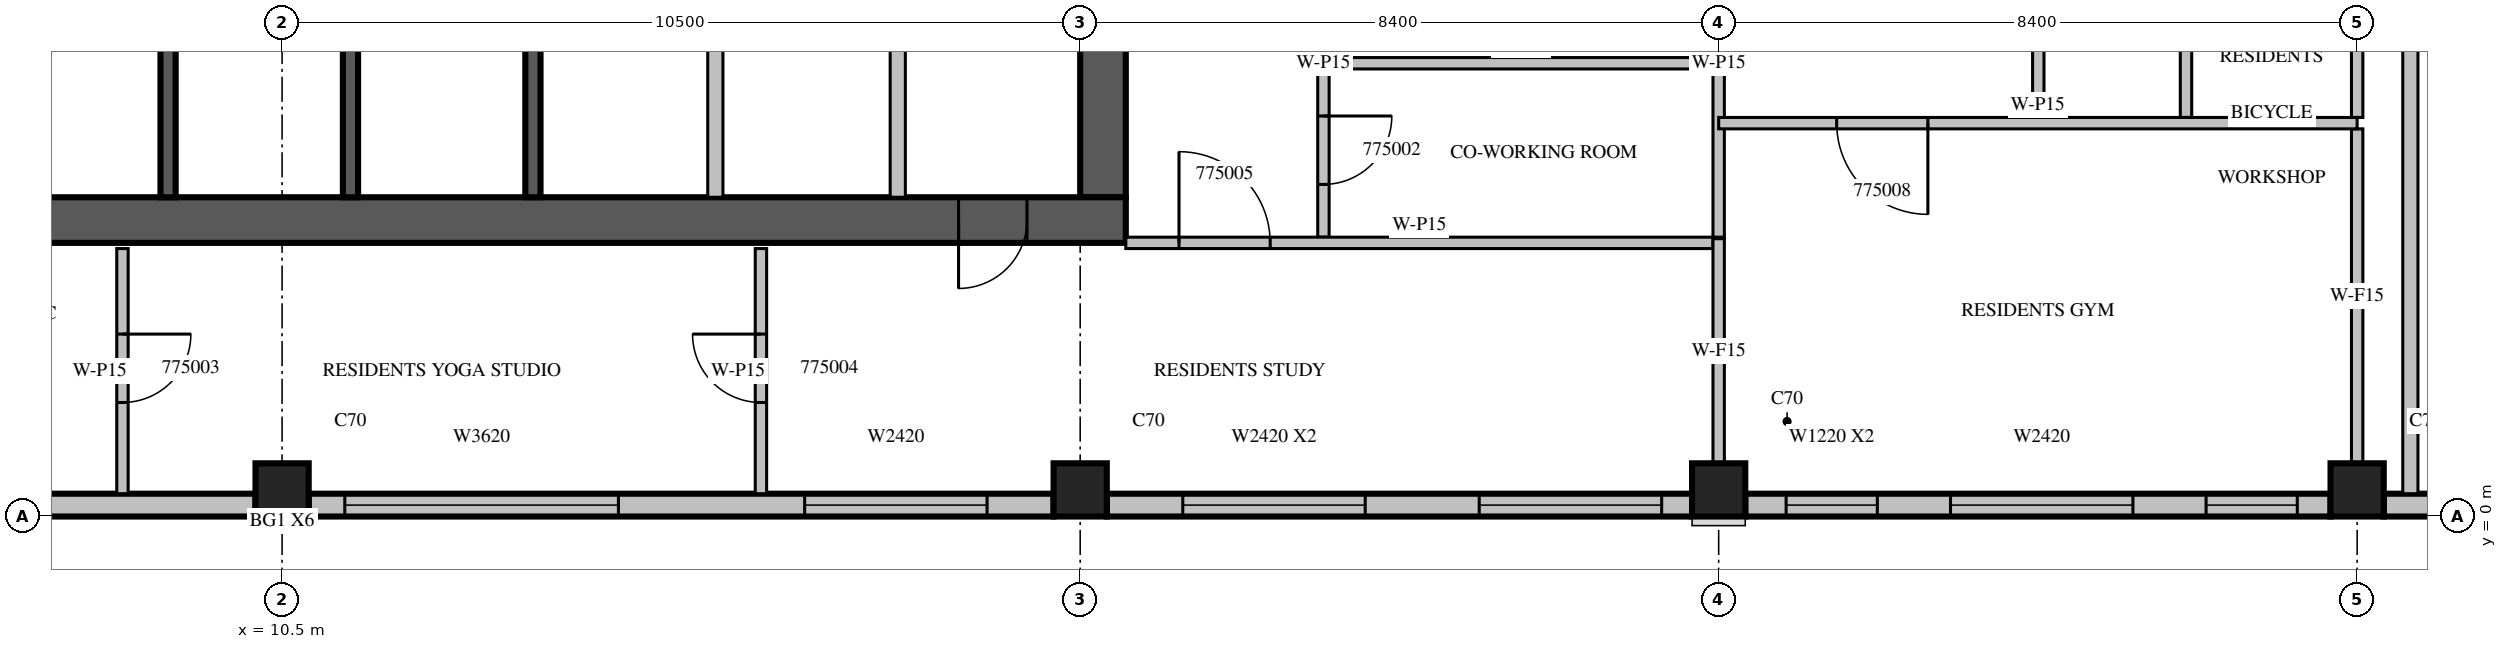
"""IFC4 building model, lengths in metres.
Left out: names, types, materials, properties, quantities, classifications, styles, units other than length and angle.
Written with IfcOpenShell. Run it as: python <this file> out.ifc"""

import sys

from ifc_helpers import new_model, si_unit, direction, frame, frame_2d, origin, origin_2d, place, context, subcontext, project, spatial, rectangle, extrude, source, transform, mapped, element, fill, save


model = new_model("IFC4")
c1 = context("Model", 3, precision=1e-05, world=origin(), true_north=direction((0.0, 1.0)))
c2 = subcontext(c1, "Body", "Model", "MODEL_VIEW")
j1 = project(units=[si_unit("LENGTHUNIT", "METRE"), si_unit("PLANEANGLEUNIT", "RADIAN")], contexts=[c1])
p1 = place(None, origin())
s1 = spatial("IfcSite", under=j1, at=p1, CompositionType="ELEMENT")
p2 = place(p1, origin())
s2 = spatial("IfcBuilding", under=s1, at=p2, CompositionType="ELEMENT")
p3 = place(p2, frame((0.0, 0.0, 323.0)))
s3 = spatial("IfcBuildingStorey", under=s2, at=p3, CompositionType="ELEMENT", Elevation=323.0)
m1 = source(origin(), c2, "Body", "SweptSolid", [
    extrude(rectangle(XDim=0.7, YDim=0.7, at=origin_2d()), origin(), (0.0, 0.0, 1.0), 3.5),
])
for number, where, z_axis, x_axis in (
    (1, (10.5, 0.35, 0.0), (0.0, 0.0, 1.0), (1.0, 0.0, 0.0)),
    (2, (21.0, 0.35, 0.0), (0.0, 0.0, 1.0), (1.0, 0.0, 0.0)),
    (3, (29.4, 0.35, 0.0), (0.0, 0.0, 1.0), (1.0, 0.0, 0.0)),
    (4, (37.8, 0.35, 0.0), (0.0, 0.0, 1.0), (1.0, 0.0, 0.0)),
):
    element("IfcColumn", number, at=place(p3, frame(where, z_axis=z_axis, x_axis=x_axis)), inside=s3, PredefinedType="COLUMN", context=c2, shape_type="MappedRepresentation", body=[
        mapped(m1, transform((0.0, 0.0, 0.0), scale=1.0)),
    ])
m2 = source(origin(), c2, "Body", "SweptSolid", [
    extrude(rectangle(XDim=6.3, YDim=0.6, at=frame_2d((3.15, 0.0))), origin(), (0.0, 0.0, 1.0), 3.5),
])
p4 = place(p3, frame((21.3, 4.2, 0.0), z_axis=(0.0, 0.0, 1.0), x_axis=(0.0, 1.0, 0.0)))
e5 = element("IfcWall", 5, at=p4, inside=s3, PredefinedType="SHEAR", context=c2, shape_type="MappedRepresentation", body=[
    mapped(m2, transform((0.0, 0.0, 0.0), scale=1.0)),
])
m3 = source(origin(), c2, "Body", "SweptSolid", [
    extrude(rectangle(XDim=2.2, YDim=2.1, at=frame_2d((1.1, 1.05))), frame((0.0, 0.31, 0.0), z_axis=(0.0, -1.0, 0.0), x_axis=(1.0, 0.0, 0.0)), (0.0, 0.0, 1.0), 0.62),
])
p5 = place(p4, frame((4.0, 0.0, 0.0)))
e6 = element("IfcOpeningElement", 6, at=p5, cuts=e5, PredefinedType="OPENING", context=c2, shape_type="MappedRepresentation", body=[
    mapped(m3, transform((0.0, 0.0, 0.0), scale=1.0)),
])
m4 = source(origin(), c2, "Body", "SweptSolid", [
    extrude(rectangle(XDim=17.4, YDim=0.6, at=frame_2d((8.7, 0.0))), origin(), (0.0, 0.0, 1.0), 3.5),
])
p6 = place(p3, frame((4.2, 3.9, 0.0), z_axis=(0.0, 0.0, 1.0), x_axis=(1.0, 0.0, 0.0)))
e7 = element("IfcWall", 7, at=p6, inside=s3, PredefinedType="SHEAR", context=c2, shape_type="MappedRepresentation", body=[
    mapped(m4, transform((0.0, 0.0, 0.0), scale=1.0)),
])
m5 = source(origin(), c2, "Body", "SweptSolid", [
    extrude(rectangle(XDim=0.9, YDim=2.1, at=frame_2d((0.45, 1.05))), frame((0.0, 0.31, 0.0), z_axis=(0.0, -1.0, 0.0), x_axis=(1.0, 0.0, 0.0)), (0.0, 0.0, 1.0), 0.62),
])
p7 = place(p6, frame((15.2, 0.0, 0.0)))
e8 = element("IfcOpeningElement", 8, at=p7, cuts=e7, PredefinedType="OPENING", context=c2, shape_type="MappedRepresentation", body=[
    mapped(m5, transform((0.0, 0.0, 0.0), scale=1.0)),
])
m6 = source(origin(), c2, "Body", "SweptSolid", [
    extrude(rectangle(XDim=5.95, YDim=0.3, at=frame_2d((2.975, 0.0))), origin(), (0.0, 0.0, 1.0), 3.1),
])
p8 = place(p3, frame((4.2, 0.15, 0.0), z_axis=(0.0, 0.0, 1.0), x_axis=(1.0, 0.0, 0.0)))
e9 = element("IfcWall", 9, at=p8, inside=s3, PredefinedType="STANDARD", context=c2, shape_type="MappedRepresentation", body=[
    mapped(m6, transform((0.0, 0.0, 0.0), scale=1.0)),
])
m7 = source(origin(), c2, "Body", "SweptSolid", [
    extrude(rectangle(XDim=1.8, YDim=2.0, at=frame_2d((0.9, 1.0))), frame((0.0, 0.16, 0.0), z_axis=(0.0, -1.0, 0.0), x_axis=(1.0, 0.0, 0.0)), (0.0, 0.0, 1.0), 0.32),
])
p9 = place(p8, frame((0.675, 0.0, 0.6)))
e10 = element("IfcOpeningElement", 10, at=p9, cuts=e9, PredefinedType="OPENING", context=c2, shape_type="MappedRepresentation", body=[
    mapped(m7, transform((0.0, 0.0, 0.0), scale=1.0)),
])
m8 = source(origin(), c2, "Body", "SweptSolid", [
    extrude(rectangle(XDim=9.8, YDim=0.3, at=frame_2d((4.9, 0.0))), origin(), (0.0, 0.0, 1.0), 3.1),
])
p10 = place(p3, frame((10.85, 0.15, 0.0), z_axis=(0.0, 0.0, 1.0), x_axis=(1.0, 0.0, 0.0)))
e11 = element("IfcWall", 11, at=p10, inside=s3, PredefinedType="STANDARD", context=c2, shape_type="MappedRepresentation", body=[
    mapped(m8, transform((0.0, 0.0, 0.0), scale=1.0)),
])
m9 = source(origin(), c2, "Body", "SweptSolid", [
    extrude(rectangle(XDim=3.6, YDim=2.0, at=frame_2d((1.8, 1.0))), frame((0.0, 0.16, 0.0), z_axis=(0.0, -1.0, 0.0), x_axis=(1.0, 0.0, 0.0)), (0.0, 0.0, 1.0), 0.32),
])
p11 = place(p10, frame((0.475, 0.0, 0.6)))
e12 = element("IfcOpeningElement", 12, at=p11, cuts=e11, PredefinedType="OPENING", context=c2, shape_type="MappedRepresentation", body=[
    mapped(m9, transform((0.0, 0.0, 0.0), scale=1.0)),
])
m10 = source(origin(), c2, "Body", "SweptSolid", [
    extrude(rectangle(XDim=2.4, YDim=2.0, at=frame_2d((1.2, 1.0))), frame((0.0, 0.16, 0.0), z_axis=(0.0, -1.0, 0.0), x_axis=(1.0, 0.0, 0.0)), (0.0, 0.0, 1.0), 0.32),
])
p12 = place(p10, frame((6.525, 0.0, 0.6)))
e13 = element("IfcOpeningElement", 13, at=p12, cuts=e11, PredefinedType="OPENING", context=c2, shape_type="MappedRepresentation", body=[
    mapped(m10, transform((0.0, 0.0, 0.0), scale=1.0)),
])
m11 = source(origin(), c2, "Body", "SweptSolid", [
    extrude(rectangle(XDim=7.7, YDim=0.3, at=frame_2d((3.85, 0.0))), origin(), (0.0, 0.0, 1.0), 3.1),
])
p13 = place(p3, frame((21.35, 0.15, 0.0), z_axis=(0.0, 0.0, 1.0), x_axis=(1.0, 0.0, 0.0)))
e14 = element("IfcWall", 14, at=p13, inside=s3, PredefinedType="STANDARD", context=c2, shape_type="MappedRepresentation", body=[
    mapped(m11, transform((0.0, 0.0, 0.0), scale=1.0)),
])
p14 = place(p13, frame((1.0, 0.0, 0.6)))
e15 = element("IfcOpeningElement", 15, at=p14, cuts=e14, PredefinedType="OPENING", context=c2, shape_type="MappedRepresentation", body=[
    mapped(m10, transform((0.0, 0.0, 0.0), scale=1.0)),
])
p15 = place(p13, frame((4.9, 0.0, 0.6)))
e16 = element("IfcOpeningElement", 16, at=p15, cuts=e14, PredefinedType="OPENING", context=c2, shape_type="MappedRepresentation", body=[
    mapped(m10, transform((0.0, 0.0, 0.0), scale=1.0)),
])
p16 = place(p3, frame((29.75, 0.15, 0.0), z_axis=(0.0, 0.0, 1.0), x_axis=(1.0, 0.0, 0.0)))
e17 = element("IfcWall", 17, at=p16, inside=s3, PredefinedType="STANDARD", context=c2, shape_type="MappedRepresentation", body=[
    mapped(m11, transform((0.0, 0.0, 0.0), scale=1.0)),
])
m12 = source(origin(), c2, "Body", "SweptSolid", [
    extrude(rectangle(XDim=1.2, YDim=2.0, at=frame_2d((0.6, 1.0))), frame((0.0, 0.16, 0.0), z_axis=(0.0, -1.0, 0.0), x_axis=(1.0, 0.0, 0.0)), (0.0, 0.0, 1.0), 0.32),
])
p17 = place(p16, frame((0.537, 0.0, 0.6)))
e18 = element("IfcOpeningElement", 18, at=p17, cuts=e17, PredefinedType="OPENING", context=c2, shape_type="MappedRepresentation", body=[
    mapped(m12, transform((0.0, 0.0, 0.0), scale=1.0)),
])
p18 = place(p16, frame((6.062, 0.0, 0.6)))
e19 = element("IfcOpeningElement", 19, at=p18, cuts=e17, PredefinedType="OPENING", context=c2, shape_type="MappedRepresentation", body=[
    mapped(m12, transform((0.0, 0.0, 0.0), scale=1.0)),
])
p19 = place(p16, frame((2.7, 0.0, 0.6)))
e20 = element("IfcOpeningElement", 20, at=p19, cuts=e17, PredefinedType="OPENING", context=c2, shape_type="MappedRepresentation", body=[
    mapped(m10, transform((0.0, 0.0, 0.0), scale=1.0)),
])
m13 = source(origin(), c2, "Body", "SweptSolid", [
    extrude(rectangle(XDim=2.05, YDim=0.3, at=frame_2d((1.025, 0.0))), origin(), (0.0, 0.0, 1.0), 3.1),
])
p20 = place(p3, frame((38.15, 0.15, 0.0), z_axis=(0.0, 0.0, 1.0), x_axis=(1.0, 0.0, 0.0)))
e21 = element("IfcWall", 21, at=p20, inside=s3, PredefinedType="STANDARD", context=c2, shape_type="MappedRepresentation", body=[
    mapped(m13, transform((0.0, 0.0, 0.0), scale=1.0)),
])
m14 = source(origin(), c2, "Body", "SweptSolid", [
    extrude(rectangle(XDim=3.1, YDim=0.2, at=frame_2d((1.55, 0.0))), origin(), (0.0, 0.0, 1.0), 3.5),
])
for number, where, z_axis, x_axis in (
    (22, (9.0, 4.2, 0.0), (0.0, 0.0, 1.0), (0.0, 1.0, 0.0)),
    (23, (11.4, 4.2, 0.0), (0.0, 0.0, 1.0), (0.0, 1.0, 0.0)),
):
    element("IfcWall", number, at=place(p3, frame(where, z_axis=z_axis, x_axis=x_axis)), inside=s3, PredefinedType="SOLIDWALL", context=c2, shape_type="MappedRepresentation", body=[
        mapped(m14, transform((0.0, 0.0, 0.0), scale=1.0)),
    ])
m15 = source(origin(), c2, "Body", "SweptSolid", [
    extrude(rectangle(XDim=3.1, YDim=0.2, at=frame_2d((1.55, 0.0))), origin(), (0.0, 0.0, 1.0), 3.1),
])
p21 = place(p3, frame((13.8, 4.2, 0.0), z_axis=(0.0, 0.0, 1.0), x_axis=(0.0, 1.0, 0.0)))
e24 = element("IfcWall", 24, at=p21, inside=s3, PredefinedType="SOLIDWALL", context=c2, shape_type="MappedRepresentation", body=[
    mapped(m15, transform((0.0, 0.0, 0.0), scale=1.0)),
])
m16 = source(origin(), c2, "Body", "SweptSolid", [
    extrude(rectangle(XDim=3.1, YDim=0.2, at=frame_2d((1.55, 0.0))), origin(), (0.0, 0.0, 1.0), 3.1),
])
for number, where, z_axis, x_axis in (
    (25, (16.2, 4.2, 0.0), (0.0, 0.0, 1.0), (0.0, 1.0, 0.0)),
    (26, (18.6, 4.2, 0.0), (0.0, 0.0, 1.0), (0.0, 1.0, 0.0)),
):
    element("IfcWall", number, at=place(p3, frame(where, z_axis=z_axis, x_axis=x_axis)), inside=s3, PredefinedType="PARTITIONING", context=c2, shape_type="MappedRepresentation", body=[
        mapped(m16, transform((0.0, 0.0, 0.0), scale=1.0)),
    ])
m17 = source(origin(), c2, "Body", "SweptSolid", [
    extrude(rectangle(XDim=8.0, YDim=0.2, at=frame_2d((4.0, 0.0))), origin(), (0.0, 0.0, 1.0), 3.1),
])
p22 = place(p3, frame((38.5, 0.3, 0.0), z_axis=(0.0, 0.0, 1.0), x_axis=(0.0, 1.0, 0.0)))
e27 = element("IfcWall", 27, at=p22, inside=s3, PredefinedType="PARTITIONING", context=c2, shape_type="MappedRepresentation", body=[
    mapped(m17, transform((0.0, 0.0, 0.0), scale=1.0)),
])
m18 = source(origin(), c2, "Body", "SweptSolid", [
    extrude(rectangle(XDim=4.575, YDim=0.15, at=frame_2d((2.288, 0.0))), origin(), (0.0, 0.0, 1.0), 3.1),
])
p23 = place(p3, frame((24.2, 8.25, 0.0), z_axis=(0.0, 0.0, 1.0), x_axis=(0.0, -1.0, 0.0)))
e28 = element("IfcWall", 28, at=p23, inside=s3, PredefinedType="PARTITIONING", context=c2, shape_type="MappedRepresentation", body=[
    mapped(m18, transform((0.0, 0.0, 0.0), scale=1.0)),
])
m19 = source(origin(), c2, "Body", "SweptSolid", [
    extrude(rectangle(XDim=0.9, YDim=2.1, at=frame_2d((0.45, 1.05))), frame((0.0, 0.085, 0.0), z_axis=(0.0, -1.0, 0.0), x_axis=(1.0, 0.0, 0.0)), (0.0, 0.0, 1.0), 0.17),
])
p24 = place(p23, frame((2.981, 0.0, 0.0)))
e29 = element("IfcOpeningElement", 29, at=p24, cuts=e28, PredefinedType="OPENING", context=c2, shape_type="MappedRepresentation", body=[
    mapped(m19, transform((0.0, 0.0, 0.0), scale=1.0)),
])
p25 = place(p3, frame((29.4, 3.675, 0.0), z_axis=(0.0, 0.0, 1.0), x_axis=(0.0, 1.0, 0.0)))
e30 = element("IfcWall", 30, at=p25, inside=s3, PredefinedType="PARTITIONING", context=c2, shape_type="MappedRepresentation", body=[
    mapped(m18, transform((0.0, 0.0, 0.0), scale=1.0)),
])
m20 = source(origin(), c2, "Body", "SweptSolid", [
    extrude(rectangle(XDim=5.05, YDim=0.15, at=frame_2d((2.525, 0.0))), origin(), (0.0, 0.0, 1.0), 3.1),
])
p26 = place(p3, frame((29.325, 5.963, 0.0), z_axis=(0.0, 0.0, 1.0), x_axis=(-1.0, 0.0, 0.0)))
e31 = element("IfcWall", 31, at=p26, inside=s3, PredefinedType="PARTITIONING", context=c2, shape_type="MappedRepresentation", body=[
    mapped(m20, transform((0.0, 0.0, 0.0), scale=1.0)),
])
m21 = source(origin(), c2, "Body", "SweptSolid", [
    extrude(rectangle(XDim=3.225, YDim=0.15, at=frame_2d((1.613, 0.0))), origin(), (0.0, 0.0, 1.0), 3.1),
])
p27 = place(p3, frame((8.4, 3.525, 0.0), z_axis=(0.0, 0.0, 1.0), x_axis=(0.0, -1.0, 0.0)))
e32 = element("IfcWall", 32, at=p27, inside=s3, PredefinedType="PARTITIONING", context=c2, shape_type="MappedRepresentation", body=[
    mapped(m21, transform((0.0, 0.0, 0.0), scale=1.0)),
])
p28 = place(p27, frame((1.125, 0.0, 0.0)))
e33 = element("IfcOpeningElement", 33, at=p28, cuts=e32, PredefinedType="OPENING", context=c2, shape_type="MappedRepresentation", body=[
    mapped(m19, transform((0.0, 0.0, 0.0), scale=1.0)),
])
p29 = place(p3, frame((16.8, 3.525, 0.0), z_axis=(0.0, 0.0, 1.0), x_axis=(0.0, -1.0, 0.0)))
e34 = element("IfcWall", 34, at=p29, inside=s3, PredefinedType="PARTITIONING", context=c2, shape_type="MappedRepresentation", body=[
    mapped(m21, transform((0.0, 0.0, 0.0), scale=1.0)),
])
p30 = place(p29, frame((1.125, 0.0, 0.0)))
e35 = element("IfcOpeningElement", 35, at=p30, cuts=e34, PredefinedType="OPENING", context=c2, shape_type="MappedRepresentation", body=[
    mapped(m19, transform((0.0, 0.0, 0.0), scale=1.0)),
])
m22 = source(origin(), c2, "Body", "SweptSolid", [
    extrude(rectangle(XDim=7.725, YDim=0.15, at=frame_2d((3.862, 0.0))), origin(), (0.0, 0.0, 1.0), 3.1),
])
p31 = place(p3, frame((21.6, 3.6, 0.0), z_axis=(0.0, 0.0, 1.0), x_axis=(1.0, 0.0, 0.0)))
e36 = element("IfcWall", 36, at=p31, inside=s3, PredefinedType="PARTITIONING", context=c2, shape_type="MappedRepresentation", body=[
    mapped(m22, transform((0.0, 0.0, 0.0), scale=1.0)),
])
m23 = source(origin(), c2, "Body", "SweptSolid", [
    extrude(rectangle(XDim=1.2, YDim=2.1, at=frame_2d((0.6, 1.05))), frame((0.0, 0.085, 0.0), z_axis=(0.0, -1.0, 0.0), x_axis=(1.0, 0.0, 0.0)), (0.0, 0.0, 1.0), 0.17),
])
p32 = place(p31, frame((0.7, 0.0, 0.0)))
e37 = element("IfcOpeningElement", 37, at=p32, cuts=e36, PredefinedType="OPENING", context=c2, shape_type="MappedRepresentation", body=[
    mapped(m23, transform((0.0, 0.0, 0.0), scale=1.0)),
])
m24 = source(origin(), c2, "Body", "SweptSolid", [
    extrude(rectangle(XDim=3.0, YDim=0.15, at=frame_2d((1.5, 0.0))), origin(), (0.0, 0.0, 1.0), 3.1),
])
for number, where, z_axis, x_axis in (
    (38, (33.605, 5.25, 0.0), (0.0, 0.0, 1.0), (0.0, 1.0, 0.0)),
    (39, (35.548, 5.25, 0.0), (0.0, 0.0, 1.0), (0.0, 1.0, 0.0)),
):
    element("IfcWall", number, at=place(p3, frame(where, z_axis=z_axis, x_axis=x_axis)), inside=s3, PredefinedType="PARTITIONING", context=c2, shape_type="MappedRepresentation", body=[
        mapped(m24, transform((0.0, 0.0, 0.0), scale=1.0)),
    ])
m25 = source(origin(), c2, "Body", "SweptSolid", [
    extrude(rectangle(XDim=2.956, YDim=0.15, at=frame_2d((1.478, 0.0))), origin(), (0.0, 0.0, 1.0), 3.1),
])
p33 = place(p3, frame((29.4, 0.699, 0.0), z_axis=(0.0, 0.0, 1.0), x_axis=(0.0, 1.0, 0.0)))
e40 = element("IfcWall", 40, at=p33, inside=s3, PredefinedType="PARTITIONING", context=c2, shape_type="MappedRepresentation", body=[
    mapped(m25, transform((0.0, 0.0, 0.0), scale=1.0)),
])
m26 = source(origin(), c2, "Body", "SweptSolid", [
    extrude(rectangle(XDim=4.401, YDim=0.15, at=frame_2d((2.2, 0.0))), origin(), (0.0, 0.0, 1.0), 3.1),
])
p34 = place(p3, frame((37.8, 0.699, 0.0), z_axis=(0.0, 0.0, 1.0), x_axis=(0.0, 1.0, 0.0)))
e41 = element("IfcWall", 41, at=p34, inside=s3, PredefinedType="PARTITIONING", context=c2, shape_type="MappedRepresentation", body=[
    mapped(m26, transform((0.0, 0.0, 0.0), scale=1.0)),
])
p35 = place(p3, frame((37.8, 5.25, 0.0), z_axis=(0.0, 0.0, 1.0), x_axis=(0.0, 1.0, 0.0)))
e42 = element("IfcWall", 42, at=p35, inside=s3, PredefinedType="PARTITIONING", context=c2, shape_type="MappedRepresentation", body=[
    mapped(m24, transform((0.0, 0.0, 0.0), scale=1.0)),
])
m27 = source(origin(), c2, "Body", "SweptSolid", [
    extrude(rectangle(XDim=8.4, YDim=0.15, at=frame_2d((4.2, 0.0))), origin(), (0.0, 0.0, 1.0), 3.1),
])
p36 = place(p3, frame((37.8, 5.175, 0.0), z_axis=(0.0, 0.0, 1.0), x_axis=(-1.0, 0.0, 0.0)))
e43 = element("IfcWall", 43, at=p36, inside=s3, PredefinedType="PARTITIONING", context=c2, shape_type="MappedRepresentation", body=[
    mapped(m27, transform((0.0, 0.0, 0.0), scale=1.0)),
])
p37 = place(p36, frame((5.648, 0.0, 0.0)))
e44 = element("IfcOpeningElement", 44, at=p37, cuts=e43, PredefinedType="OPENING", context=c2, shape_type="MappedRepresentation", body=[
    mapped(m23, transform((0.0, 0.0, 0.0), scale=1.0)),
])
m28 = source(origin(), c2, "Body", "SweptSolid", [
    extrude(rectangle(XDim=3.6, YDim=2.0, at=frame_2d((1.8, 1.0))), frame((0.0, 0.03, 0.0), z_axis=(0.0, -1.0, 0.0), x_axis=(1.0, 0.0, 0.0)), (0.0, 0.0, 1.0), 0.06),
])
p38 = place(p11, origin())
e45 = element("IfcWindow", 45, at=p38, inside=s3, PartitioningType="SINGLE_PANEL", PredefinedType="WINDOW", context=c2, shape_type="MappedRepresentation", body=[
    mapped(m28, transform((0.0, 0.0, 0.0), scale=1.0)),
])
fill(e12, e45)
m29 = source(origin(), c2, "Body", "SweptSolid", [
    extrude(rectangle(XDim=2.4, YDim=2.0, at=frame_2d((1.2, 1.0))), frame((0.0, 0.03, 0.0), z_axis=(0.0, -1.0, 0.0), x_axis=(1.0, 0.0, 0.0)), (0.0, 0.0, 1.0), 0.06),
])
p39 = place(p12, origin())
e46 = element("IfcWindow", 46, at=p39, inside=s3, PartitioningType="SINGLE_PANEL", PredefinedType="WINDOW", context=c2, shape_type="MappedRepresentation", body=[
    mapped(m29, transform((0.0, 0.0, 0.0), scale=1.0)),
])
fill(e13, e46)
p40 = place(p14, origin())
e47 = element("IfcWindow", 47, at=p40, inside=s3, PartitioningType="SINGLE_PANEL", PredefinedType="WINDOW", context=c2, shape_type="MappedRepresentation", body=[
    mapped(m29, transform((0.0, 0.0, 0.0), scale=1.0)),
])
fill(e15, e47)
p41 = place(p15, origin())
e48 = element("IfcWindow", 48, at=p41, inside=s3, PartitioningType="SINGLE_PANEL", PredefinedType="WINDOW", context=c2, shape_type="MappedRepresentation", body=[
    mapped(m29, transform((0.0, 0.0, 0.0), scale=1.0)),
])
fill(e16, e48)
m30 = source(origin(), c2, "Body", "SweptSolid", [
    extrude(rectangle(XDim=1.2, YDim=2.0, at=frame_2d((0.6, 1.0))), frame((0.0, 0.03, 0.0), z_axis=(0.0, -1.0, 0.0), x_axis=(1.0, 0.0, 0.0)), (0.0, 0.0, 1.0), 0.06),
])
p42 = place(p17, origin())
e49 = element("IfcWindow", 49, at=p42, inside=s3, PartitioningType="SINGLE_PANEL", PredefinedType="WINDOW", context=c2, shape_type="MappedRepresentation", body=[
    mapped(m30, transform((0.0, 0.0, 0.0), scale=1.0)),
])
fill(e18, e49)
p43 = place(p18, origin())
e50 = element("IfcWindow", 50, at=p43, inside=s3, PartitioningType="SINGLE_PANEL", PredefinedType="WINDOW", context=c2, shape_type="MappedRepresentation", body=[
    mapped(m30, transform((0.0, 0.0, 0.0), scale=1.0)),
])
fill(e19, e50)
p44 = place(p19, origin())
e51 = element("IfcWindow", 51, at=p44, inside=s3, PartitioningType="SINGLE_PANEL", PredefinedType="WINDOW", context=c2, shape_type="MappedRepresentation", body=[
    mapped(m29, transform((0.0, 0.0, 0.0), scale=1.0)),
])
fill(e20, e51)
m31 = source(origin(), c2, "Body", "SweptSolid", [
    extrude(rectangle(XDim=0.9, YDim=2.1, at=frame_2d((0.45, 1.05))), frame((0.0, 0.025, 0.0), z_axis=(0.0, -1.0, 0.0), x_axis=(1.0, 0.0, 0.0)), (0.0, 0.0, 1.0), 0.05),
])
p45 = place(p7, origin())
e52 = element("IfcDoor", 52, at=p45, inside=s3, OperationType="SINGLE_SWING_RIGHT", PredefinedType="DOOR", context=c2, shape_type="MappedRepresentation", body=[
    mapped(m31, transform((0.0, 0.0, 0.0), scale=1.0)),
])
fill(e8, e52)
p46 = place(p24, origin())
e53 = element("IfcDoor", 53, at=p46, inside=s3, OperationType="SINGLE_SWING_LEFT", PredefinedType="DOOR", context=c2, shape_type="MappedRepresentation", body=[
    mapped(m31, transform((0.0, 0.0, 0.0), scale=1.0)),
])
fill(e29, e53)
p47 = place(p28, origin())
e54 = element("IfcDoor", 54, at=p47, inside=s3, OperationType="SINGLE_SWING_LEFT", PredefinedType="DOOR", context=c2, shape_type="MappedRepresentation", body=[
    mapped(m31, transform((0.0, 0.0, 0.0), scale=1.0)),
])
fill(e33, e54)
p48 = place(p30, origin())
e55 = element("IfcDoor", 55, at=p48, inside=s3, OperationType="SINGLE_SWING_RIGHT", PredefinedType="DOOR", context=c2, shape_type="MappedRepresentation", body=[
    mapped(m31, transform((0.0, 0.0, 0.0), scale=1.0)),
])
fill(e35, e55)
m32 = source(origin(), c2, "Body", "SweptSolid", [
    extrude(rectangle(XDim=1.2, YDim=2.1, at=frame_2d((0.6, 1.05))), frame((0.0, 0.025, 0.0), z_axis=(0.0, -1.0, 0.0), x_axis=(1.0, 0.0, 0.0)), (0.0, 0.0, 1.0), 0.05),
])
p49 = place(p32, origin())
e56 = element("IfcDoor", 56, at=p49, inside=s3, OperationType="SINGLE_SWING_LEFT", PredefinedType="DOOR", context=c2, shape_type="MappedRepresentation", body=[
    mapped(m32, transform((0.0, 0.0, 0.0), scale=1.0)),
])
fill(e37, e56)
p50 = place(p37, origin())
e57 = element("IfcDoor", 57, at=p50, inside=s3, OperationType="SINGLE_SWING_LEFT", PredefinedType="DOOR", context=c2, shape_type="MappedRepresentation", body=[
    mapped(m32, transform((0.0, 0.0, 0.0), scale=1.0)),
])
fill(e44, e57)
save(model, sys.argv[1])
